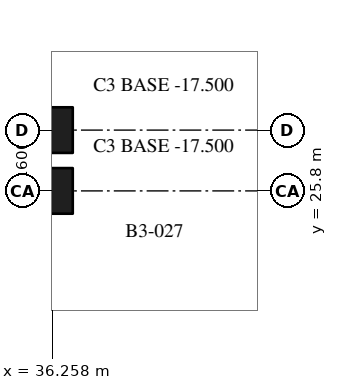
"""IFC4 building model, lengths in metres.
Left out: names, types, materials, properties, quantities, classifications, styles, units other than length and angle.
Written with IfcOpenShell. Run it as: python <this file> out.ifc"""

import sys

from ifc_helpers import new_model, si_unit, direction, frame, origin, origin_2d, place, context, subcontext, project, spatial, rectangle, extrude, element, save


model = new_model("IFC4")
c1 = context("Model", 3, precision=1e-05, world=origin(), true_north=direction((0.0, 1.0)))
c2 = subcontext(c1, "Body", "Model", "MODEL_VIEW")
j1 = project(units=[si_unit("LENGTHUNIT", "METRE"), si_unit("PLANEANGLEUNIT", "RADIAN")], contexts=[c1])
p1 = place(None, origin())
s1 = spatial("IfcSite", under=j1, at=p1, CompositionType="ELEMENT")
p2 = place(p1, origin())
s2 = spatial("IfcBuilding", under=s1, at=p2, CompositionType="ELEMENT")
p3 = place(p2, frame((0.0, 0.0, -17.0)))
s3 = spatial("IfcBuildingStorey", under=s2, at=p3, CompositionType="ELEMENT", Elevation=-17.0)
for number, where, z_axis, x_axis in (
    (1, (36.2, 25.8, -0.5), (0.0, 0.0, 1.0), (1.0, 0.0, 0.0)),
    (2, (36.2, 27.4, -0.5), (0.0, 0.0, 1.0), (1.0, 0.0, 0.0)),
):
    element("IfcColumn", number, at=place(p3, frame(where, z_axis=z_axis, x_axis=x_axis)), inside=s3, PredefinedType="COLUMN", context=c2, shape_type="SweptSolid", body=[
        extrude(rectangle(XDim=1.2, YDim=1.2, at=origin_2d()), origin(), (0.0, 0.0, 1.0), 5.5),
    ])
save(model, sys.argv[1])
